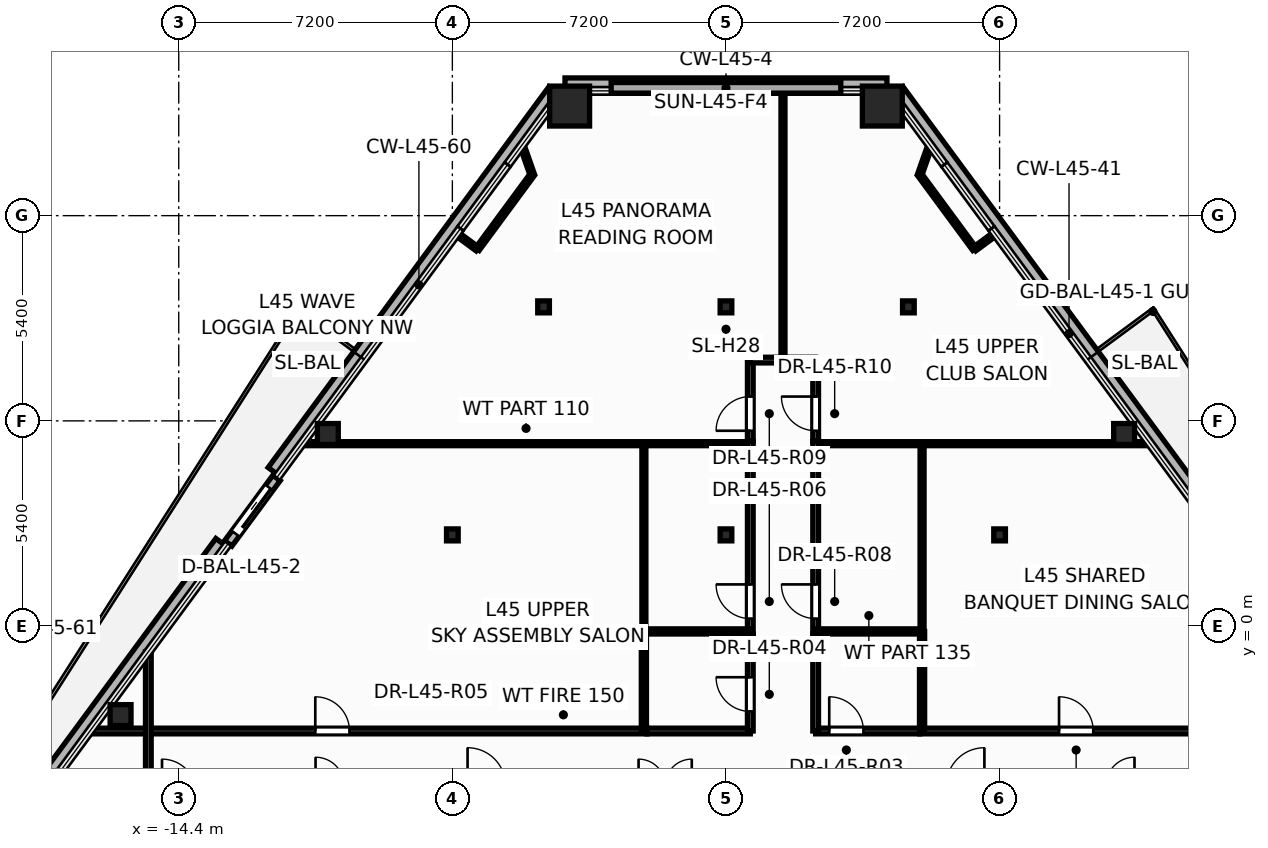
"""IFC4 building model, lengths in metres.
Left out: names, types, materials, properties, quantities, classifications, styles, units other than length and angle.
Written with IfcOpenShell. Run it as: python <this file> out.ifc"""

import sys

from ifc_helpers import new_model, si_unit, direction, frame, frame_2d, origin, origin_2d, place, context, subcontext, project, spatial, rectangle, hollow_rectangle, hollow_circle, i_section, extrude, element, fill, save


model = new_model("IFC4")
c1 = context("Model", 3, precision=1e-05, world=origin(), true_north=direction((0.0, 1.0)))
c2 = subcontext(c1, "Body", "Model", "MODEL_VIEW")
j1 = project(units=[si_unit("LENGTHUNIT", "METRE"), si_unit("PLANEANGLEUNIT", "RADIAN")], contexts=[c1])
p1 = place(None, origin())
s1 = spatial("IfcSite", under=j1, at=p1, CompositionType="ELEMENT")
p2 = place(p1, origin())
s2 = spatial("IfcBuilding", under=s1, at=p2, CompositionType="ELEMENT")
p3 = place(p2, frame((0.0, 0.0, 173.7)))
s3 = spatial("IfcBuildingStorey", under=s2, at=p3, CompositionType="ELEMENT", Elevation=173.7)
for number, where, z_axis, x_axis in (
    (1, (4.114, 13.684, 0.0), (0.0, 0.0, 1.0), (1.0, 0.0, 0.0)),
    (2, (-4.114, 13.684, 0.0), (0.0, 0.0, 1.0), (1.0, 0.0, 0.0)),
):
    element("IfcColumn", number, at=place(p3, frame(where, z_axis=z_axis, x_axis=x_axis)), inside=s3, PredefinedType="COLUMN", context=c2, shape_type="SweptSolid", body=[
        extrude(hollow_rectangle(XDim=1.05, YDim=1.05, WallThickness=0.045, at=origin_2d()), origin(), (0.0, 0.0, 1.0), 4.8),
    ])
for number, where, z_axis, x_axis in (
    (3, (10.477, 5.055, 0.0), (0.0, 0.0, 1.0), (1.0, 0.0, 0.0)),
    (4, (-10.477, 5.055, 0.0), (0.0, 0.0, 1.0), (1.0, 0.0, 0.0)),
    (5, (-15.931, -2.341, 0.0), (0.0, 0.0, 1.0), (1.0, 0.0, 0.0)),
):
    element("IfcColumn", number, at=place(p3, frame(where, z_axis=z_axis, x_axis=x_axis)), inside=s3, PredefinedType="COLUMN", context=c2, shape_type="SweptSolid", body=[
        extrude(hollow_circle(Radius=0.275, WallThickness=0.024, at=origin_2d()), origin(), (0.0, 0.0, 1.0), 4.8),
    ])
for number, where, z_axis, x_axis in (
    (6, (-7.2, 2.4, 0.0), (0.0, 0.0, 1.0), (1.0, 0.0, 0.0)),
    (7, (0.0, 2.4, 0.0), (0.0, 0.0, 1.0), (1.0, 0.0, 0.0)),
    (8, (7.2, 2.4, 0.0), (0.0, 0.0, 1.0), (1.0, 0.0, 0.0)),
    (9, (-4.8, 8.4, 0.0), (0.0, 0.0, 1.0), (1.0, 0.0, 0.0)),
    (10, (0.0, 8.4, 0.0), (0.0, 0.0, 1.0), (1.0, 0.0, 0.0)),
    (11, (4.8, 8.4, 0.0), (0.0, 0.0, 1.0), (1.0, 0.0, 0.0)),
):
    element("IfcColumn", number, at=place(p3, frame(where, z_axis=z_axis, x_axis=x_axis)), inside=s3, PredefinedType="COLUMN", context=c2, shape_type="SweptSolid", body=[
        extrude(i_section(OverallWidth=0.307, OverallDepth=0.314, WebThickness=0.012, FlangeThickness=0.019, at=origin_2d()), origin(), (0.0, 0.0, 1.0), 4.8),
    ])
p4 = place(p3, frame((13.795, 1.498, -0.2), z_axis=(0.0, 0.0, 1.0), x_axis=(-0.593484495124, 0.804845422455, 0.0)))
e12 = element("IfcWall", 12, at=p4, inside=s3, PredefinedType="PARAPET", context=c2, shape_type="SweptSolid", body=[
    extrude(rectangle(XDim=15.635, YDim=0.36, at=frame_2d((7.818, 0.0))), origin(), (0.0, 0.0, 1.0), 0.38),
])
p5 = place(p3, frame((4.236, 14.244, -0.2), z_axis=(0.0, 0.0, 1.0), x_axis=(-1.0, 0.0, 0.0)))
e13 = element("IfcWall", 13, at=p5, inside=s3, PredefinedType="PARAPET", context=c2, shape_type="SweptSolid", body=[
    extrude(rectangle(XDim=8.472, YDim=0.36, at=frame_2d((4.236, 0.0))), origin(), (0.0, 0.0, 1.0), 0.38),
])
p6 = place(p3, frame((-4.516, 14.082, -0.2), z_axis=(0.0, 0.0, 1.0), x_axis=(-0.593482739704, -0.804846716881, 0.0)))
e14 = element("IfcWall", 14, at=p6, inside=s3, PredefinedType="PARAPET", context=c2, shape_type="SweptSolid", body=[
    extrude(rectangle(XDim=12.445, YDim=0.36, at=frame_2d((6.222, 0.0))), origin(), (0.0, 0.0, 1.0), 0.38),
])
p7 = place(p3, frame((-13.279, 2.199, -0.2), z_axis=(0.0, 0.0, 1.0), x_axis=(-0.593480482425, -0.804848381362, 0.0)))
e15 = element("IfcWall", 15, at=p7, inside=s3, PredefinedType="PARAPET", context=c2, shape_type="SweptSolid", body=[
    extrude(rectangle(XDim=16.125, YDim=0.36, at=frame_2d((8.062, 0.0))), origin(), (0.0, 0.0, 1.0), 0.38),
])
p8 = place(p3, frame((-11.826, 3.899, -0.015), z_axis=(0.0, 0.0, 1.0), x_axis=(-0.593537527179, -0.804806314482, 0.0)))
e16 = element("IfcWall", 16, at=p8, inside=s3, PredefinedType="STANDARD", context=c2, shape_type="SweptSolid", body=[
    extrude(rectangle(XDim=2.14, YDim=0.24, at=frame_2d((1.07, 0.0))), origin(), (0.0, 0.0, 1.0), 4.007),
])
p9 = place(p8, frame((0.32, 0.0, 0.015)))
e17 = element("IfcOpeningElement", 17, at=p9, cuts=e16, PredefinedType="OPENING", context=c2, shape_type="SweptSolid", body=[
    extrude(rectangle(XDim=1.506, YDim=2.204, at=frame_2d((0.75, 1.102))), frame((0.0, 0.13, 0.0), z_axis=(0.0, -1.0, 0.0), x_axis=(1.0, 0.0, 0.0)), (0.0, 0.0, 1.0), 0.26),
])
p10 = place(p3, frame((-16.737, -2.76, 0.0), z_axis=(0.0, 0.0, 1.0), x_axis=(1.0, 0.0, 0.0)))
e18 = element("IfcWall", 18, at=p10, inside=s3, PredefinedType="PARTITIONING", context=c2, shape_type="SweptSolid", body=[
    extrude(rectangle(XDim=14.656, YDim=0.15, at=frame_2d((7.328, 0.0))), origin(), (0.0, 0.0, 1.0), 3.525),
])
p11 = place(p10, frame((5.929, 0.0, 0.0)))
e19 = element("IfcOpeningElement", 19, at=p11, cuts=e18, PredefinedType="OPENING", context=c2, shape_type="SweptSolid", body=[
    extrude(rectangle(XDim=0.906, YDim=2.104, at=frame_2d((0.45, 1.052))), frame((0.0, 0.085, 0.0), z_axis=(0.0, -1.0, 0.0), x_axis=(1.0, 0.0, 0.0)), (0.0, 0.0, 1.0), 0.17),
])
p12 = place(p3, frame((5.1, -2.76, 0.0), z_axis=(0.0, 0.0, 1.0), x_axis=(1.0, 0.0, 0.0)))
e20 = element("IfcWall", 20, at=p12, inside=s3, PredefinedType="PARTITIONING", context=c2, shape_type="SweptSolid", body=[
    extrude(rectangle(XDim=11.636, YDim=0.15, at=frame_2d((5.818, 0.0))), origin(), (0.0, 0.0, 1.0), 3.525),
])
p13 = place(p12, frame((3.664, 0.0, 0.0)))
e21 = element("IfcOpeningElement", 21, at=p13, cuts=e20, PredefinedType="OPENING", context=c2, shape_type="SweptSolid", body=[
    extrude(rectangle(XDim=0.906, YDim=2.104, at=frame_2d((0.45, 1.052))), frame((0.0, 0.085, 0.0), z_axis=(0.0, -1.0, 0.0), x_axis=(1.0, 0.0, 0.0)), (0.0, 0.0, 1.0), 0.17),
])
p14 = place(p3, frame((-11.162, 4.8, 0.0), z_axis=(0.0, 0.0, 1.0), x_axis=(1.0, 0.0, 0.0)))
e22 = element("IfcWall", 22, at=p14, inside=s3, PredefinedType="PARTITIONING", context=c2, shape_type="SweptSolid", body=[
    extrude(rectangle(XDim=11.802, YDim=0.105, at=frame_2d((5.901, 0.0))), origin(), (0.0, 0.0, 1.0), 3.525),
])
p15 = place(p3, frame((1.5, 7.0, 0.0), z_axis=(0.0, 0.0, 1.0), x_axis=(0.0, 1.0, 0.0)))
e23 = element("IfcWall", 23, at=p15, inside=s3, PredefinedType="PARTITIONING", context=c2, shape_type="SweptSolid", body=[
    extrude(rectangle(XDim=7.083, YDim=0.105, at=frame_2d((3.542, 0.0))), origin(), (0.0, 0.0, 1.0), 3.825),
])
p16 = place(p3, frame((2.36, 4.8, 0.0), z_axis=(0.0, 0.0, 1.0), x_axis=(1.0, 0.0, 0.0)))
e24 = element("IfcWall", 24, at=p16, inside=s3, PredefinedType="PARTITIONING", context=c2, shape_type="SweptSolid", body=[
    extrude(rectangle(XDim=8.802, YDim=0.105, at=frame_2d((4.401, 0.0))), origin(), (0.0, 0.0, 1.0), 3.825),
])
p17 = place(p3, frame((0.64, -0.2, 0.0), z_axis=(0.0, 0.0, 1.0), x_axis=(0.0, 1.0, 0.0)))
e25 = element("IfcWall", 25, at=p17, inside=s3, PredefinedType="PARTITIONING", context=c2, shape_type="SweptSolid", body=[
    extrude(rectangle(XDim=5.06, YDim=0.15, at=frame_2d((2.53, 0.0))), origin(), (0.0, 0.0, 1.0), 3.525),
])
p18 = place(p17, frame((0.397, 0.0, 0.0)))
e26 = element("IfcOpeningElement", 26, at=p18, cuts=e25, PredefinedType="OPENING", context=c2, shape_type="SweptSolid", body=[
    extrude(rectangle(XDim=0.906, YDim=2.104, at=frame_2d((0.45, 1.052))), frame((0.0, 0.085, 0.0), z_axis=(0.0, -1.0, 0.0), x_axis=(1.0, 0.0, 0.0)), (0.0, 0.0, 1.0), 0.17),
])
p19 = place(p3, frame((2.36, -0.2, 0.0), z_axis=(0.0, 0.0, 1.0), x_axis=(0.0, 1.0, 0.0)))
e27 = element("IfcWall", 27, at=p19, inside=s3, PredefinedType="PARTITIONING", context=c2, shape_type="SweptSolid", body=[
    extrude(rectangle(XDim=5.06, YDim=0.15, at=frame_2d((2.53, 0.0))), origin(), (0.0, 0.0, 1.0), 3.525),
])
p20 = place(p19, frame((0.397, 0.0, 0.0)))
e28 = element("IfcOpeningElement", 28, at=p20, cuts=e27, PredefinedType="OPENING", context=c2, shape_type="SweptSolid", body=[
    extrude(rectangle(XDim=0.906, YDim=2.104, at=frame_2d((0.45, 1.052))), frame((0.0, 0.085, 0.0), z_axis=(0.0, -1.0, 0.0), x_axis=(1.0, 0.0, 0.0)), (0.0, 0.0, 1.0), 0.17),
])
for number, where, z_axis, x_axis in (
    (29, (-2.16, -0.2, 0.0), (0.0, 0.0, 1.0), (0.0, 1.0, 0.0)),
    (30, (5.16, -0.2, 0.0), (0.0, 0.0, 1.0), (0.0, 1.0, 0.0)),
):
    element("IfcWall", number, at=place(p3, frame(where, z_axis=z_axis, x_axis=x_axis)), inside=s3, PredefinedType="PARTITIONING", context=c2, shape_type="SweptSolid", body=[
        extrude(rectangle(XDim=5.0, YDim=0.105, at=frame_2d((2.5, 0.0))), origin(), (0.0, 0.0, 1.0), 3.525),
    ])
p21 = place(p3, frame((-15.2, -4.4, 0.0), z_axis=(0.0, 0.0, 1.0), x_axis=(0.0, 1.0, 0.0)))
e31 = element("IfcWall", 31, at=p21, inside=s3, PredefinedType="PARTITIONING", context=c2, shape_type="SweptSolid", body=[
    extrude(rectangle(XDim=3.724, YDim=0.15, at=frame_2d((1.862, 0.0))), origin(), (0.0, 0.0, 1.0), 3.825),
])
p22 = place(p3, frame((2.36, -2.76, 0.0), z_axis=(0.0, 0.0, 1.0), x_axis=(1.0, 0.0, 0.0)))
e32 = element("IfcWall", 32, at=p22, inside=s3, PredefinedType="PARTITIONING", context=c2, shape_type="SweptSolid", body=[
    extrude(rectangle(XDim=2.738, YDim=0.15, at=frame_2d((1.369, 0.0))), origin(), (0.0, 0.0, 1.0), 4.169),
])
p23 = place(p22, frame((0.357, 0.0, 0.0)))
e33 = element("IfcOpeningElement", 33, at=p23, cuts=e32, PredefinedType="OPENING", context=c2, shape_type="SweptSolid", body=[
    extrude(rectangle(XDim=0.906, YDim=2.104, at=frame_2d((0.45, 1.052))), frame((0.0, 0.085, 0.0), z_axis=(0.0, -1.0, 0.0), x_axis=(1.0, 0.0, 0.0)), (0.0, 0.0, 1.0), 0.17),
])
p24 = place(p3, frame((-2.078, -2.76, 0.0), z_axis=(0.0, 0.0, 1.0), x_axis=(1.0, 0.0, 0.0)))
e34 = element("IfcWall", 34, at=p24, inside=s3, PredefinedType="PARTITIONING", context=c2, shape_type="SweptSolid", body=[
    extrude(rectangle(XDim=2.718, YDim=0.15, at=frame_2d((1.359, 0.0))), origin(), (0.0, 0.0, 1.0), 3.525),
])
p25 = place(p3, frame((2.36, -0.14, 0.0), z_axis=(0.0, 0.0, 1.0), x_axis=(1.0, 0.0, 0.0)))
e35 = element("IfcWall", 35, at=p25, inside=s3, PredefinedType="PARTITIONING", context=c2, shape_type="SweptSolid", body=[
    extrude(rectangle(XDim=2.8, YDim=0.135, at=frame_2d((1.4, 0.0))), origin(), (0.0, 0.0, 1.0), 4.169),
])
p26 = place(p3, frame((-2.16, -0.14, 0.0), z_axis=(0.0, 0.0, 1.0), x_axis=(1.0, 0.0, 0.0)))
e36 = element("IfcWall", 36, at=p26, inside=s3, PredefinedType="PARTITIONING", context=c2, shape_type="SweptSolid", body=[
    extrude(rectangle(XDim=2.8, YDim=0.135, at=frame_2d((1.4, 0.0))), origin(), (0.0, 0.0, 1.0), 3.525),
])
p27 = place(p3, frame((2.36, -2.76, 0.0), z_axis=(0.0, 0.0, 1.0), x_axis=(0.0, 1.0, 0.0)))
e37 = element("IfcWall", 37, at=p27, inside=s3, PredefinedType="PARTITIONING", context=c2, shape_type="SweptSolid", body=[
    extrude(rectangle(XDim=2.558, YDim=0.15, at=frame_2d((1.279, 0.0))), origin(), (0.0, 0.0, 1.0), 4.55),
])
p28 = place(p3, frame((0.64, -2.76, 0.0), z_axis=(0.0, 0.0, 1.0), x_axis=(0.0, 1.0, 0.0)))
e38 = element("IfcWall", 38, at=p28, inside=s3, PredefinedType="PARTITIONING", context=c2, shape_type="SweptSolid", body=[
    extrude(rectangle(XDim=2.558, YDim=0.15, at=frame_2d((1.279, 0.0))), origin(), (0.0, 0.0, 1.0), 4.55),
])
p29 = place(p28, frame((0.515, 0.0, 0.0)))
e39 = element("IfcOpeningElement", 39, at=p29, cuts=e38, PredefinedType="OPENING", context=c2, shape_type="SweptSolid", body=[
    extrude(rectangle(XDim=0.906, YDim=2.104, at=frame_2d((0.45, 1.052))), frame((0.0, 0.085, 0.0), z_axis=(0.0, -1.0, 0.0), x_axis=(1.0, 0.0, 0.0)), (0.0, 0.0, 1.0), 0.17),
])
for number, where, z_axis, x_axis in (
    (40, (5.16, -2.76, 0.0), (0.0, 0.0, 1.0), (0.0, 1.0, 0.0)),
    (41, (-2.16, -2.76, 0.0), (0.0, 0.0, 1.0), (0.0, 1.0, 0.0)),
):
    element("IfcWall", number, at=place(p3, frame(where, z_axis=z_axis, x_axis=x_axis)), inside=s3, PredefinedType="PARTITIONING", context=c2, shape_type="SweptSolid", body=[
        extrude(rectangle(XDim=2.62, YDim=0.135, at=frame_2d((1.31, 0.0))), origin(), (0.0, 0.0, 1.0), 4.55),
    ])
for number, where, z_axis, x_axis in (
    (42, (-5.098, 11.878, 0.0), (0.0, 0.0, 1.0), (-0.593, -0.805, 0.0)),
    (43, (6.54, 9.922, 0.0), (0.0, 0.0, 1.0), (-0.593, 0.805, 0.0)),
):
    element("IfcWall", number, at=place(p3, frame(where, z_axis=z_axis, x_axis=x_axis)), inside=s3, PredefinedType="PARTITIONING", context=c2, shape_type="SweptSolid", body=[
        extrude(rectangle(XDim=2.43, YDim=0.12, at=frame_2d((1.215, 0.0))), origin(), (0.0, 0.0, 1.0), 4.55),
    ])
p30 = place(p3, frame((0.64, 4.862, 0.0), z_axis=(0.0, 0.0, 1.0), x_axis=(0.0, 1.0, 0.0)))
e44 = element("IfcWall", 44, at=p30, inside=s3, PredefinedType="PARTITIONING", context=c2, shape_type="SweptSolid", body=[
    extrude(rectangle(XDim=2.138, YDim=0.15, at=frame_2d((1.069, 0.0))), origin(), (0.0, 0.0, 1.0), 4.55),
])
p31 = place(p30, frame((0.278, 0.0, 0.0)))
e45 = element("IfcOpeningElement", 45, at=p31, cuts=e44, PredefinedType="OPENING", context=c2, shape_type="SweptSolid", body=[
    extrude(rectangle(XDim=0.906, YDim=2.104, at=frame_2d((0.45, 1.052))), frame((0.0, 0.085, 0.0), z_axis=(0.0, -1.0, 0.0), x_axis=(1.0, 0.0, 0.0)), (0.0, 0.0, 1.0), 0.17),
])
p32 = place(p3, frame((2.36, 4.862, 0.0), z_axis=(0.0, 0.0, 1.0), x_axis=(0.0, 1.0, 0.0)))
e46 = element("IfcWall", 46, at=p32, inside=s3, PredefinedType="PARTITIONING", context=c2, shape_type="SweptSolid", body=[
    extrude(rectangle(XDim=2.138, YDim=0.15, at=frame_2d((1.069, 0.0))), origin(), (0.0, 0.0, 1.0), 4.169),
])
p33 = place(p32, frame((0.278, 0.0, 0.0)))
e47 = element("IfcOpeningElement", 47, at=p33, cuts=e46, PredefinedType="OPENING", context=c2, shape_type="SweptSolid", body=[
    extrude(rectangle(XDim=0.906, YDim=2.104, at=frame_2d((0.45, 1.052))), frame((0.0, 0.085, 0.0), z_axis=(0.0, -1.0, 0.0), x_axis=(1.0, 0.0, 0.0)), (0.0, 0.0, 1.0), 0.17),
])
p34 = place(p3, frame((0.64, 7.0, 0.0), z_axis=(0.0, 0.0, 1.0), x_axis=(1.0, 0.0, 0.0)))
e48 = element("IfcWall", 48, at=p34, inside=s3, PredefinedType="PARTITIONING", context=c2, shape_type="SweptSolid", body=[
    extrude(rectangle(XDim=1.72, YDim=0.15, at=frame_2d((0.86, 0.0))), origin(), (0.0, 0.0, 1.0), 4.169),
])
for number, where, z_axis, x_axis in (
    (49, (-5.367, 12.642, 0.0), (0.0, 0.0, 1.0), (0.332, -0.943, 0.0)),
    (50, (5.098, 11.878, 0.0), (0.0, 0.0, 1.0), (0.332, 0.943, 0.0)),
):
    element("IfcWall", number, at=place(p3, frame(where, z_axis=z_axis, x_axis=x_axis)), inside=s3, PredefinedType="PARTITIONING", context=c2, shape_type="SweptSolid", body=[
        extrude(rectangle(XDim=0.81, YDim=0.12, at=frame_2d((0.405, 0.0))), origin(), (0.0, 0.0, 1.0), 3.992),
    ])
for number, where, z_axis, x_axis in (
    (51, (-6.54, 9.922, 0.0), (0.0, 0.0, 1.0), (-0.805, 0.594, 0.0)),
    (52, (7.079, 10.32, 0.0), (0.0, 0.0, 1.0), (-0.805, -0.594, 0.0)),
):
    element("IfcWall", number, at=place(p3, frame(where, z_axis=z_axis, x_axis=x_axis)), inside=s3, PredefinedType="PARTITIONING", context=c2, shape_type="SweptSolid", body=[
        extrude(rectangle(XDim=0.67, YDim=0.12, at=frame_2d((0.335, 0.0))), origin(), (0.0, 0.0, 1.0), 3.992),
    ])
p35 = place(p9, origin())
e53 = element("IfcDoor", 53, at=p35, inside=s3, OperationType="SLIDING_TO_RIGHT", PredefinedType="DOOR", context=c2, shape_type="SweptSolid", body=[
    extrude(rectangle(XDim=1.5, YDim=2.2, at=frame_2d((0.75, 1.1))), frame((0.0, 0.025, 0.0), z_axis=(0.0, -1.0, 0.0), x_axis=(1.0, 0.0, 0.0)), (0.0, 0.0, 1.0), 0.05),
])
fill(e17, e53)
p36 = place(p23, origin())
e54 = element("IfcDoor", 54, at=p36, inside=s3, OperationType="SINGLE_SWING_LEFT", PredefinedType="DOOR", context=c2, shape_type="SweptSolid", body=[
    extrude(rectangle(XDim=0.9, YDim=2.1, at=frame_2d((0.45, 1.05))), frame((0.0, 0.025, 0.0), z_axis=(0.0, -1.0, 0.0), x_axis=(1.0, 0.0, 0.0)), (0.0, 0.0, 1.0), 0.05),
])
fill(e33, e54)
p37 = place(p29, origin())
e55 = element("IfcDoor", 55, at=p37, inside=s3, OperationType="SINGLE_SWING_RIGHT", PredefinedType="DOOR", context=c2, shape_type="SweptSolid", body=[
    extrude(rectangle(XDim=0.9, YDim=2.1, at=frame_2d((0.45, 1.05))), frame((0.0, 0.025, 0.0), z_axis=(0.0, -1.0, 0.0), x_axis=(1.0, 0.0, 0.0)), (0.0, 0.0, 1.0), 0.05),
])
fill(e39, e55)
p38 = place(p11, origin())
e56 = element("IfcDoor", 56, at=p38, inside=s3, OperationType="SINGLE_SWING_LEFT", PredefinedType="DOOR", context=c2, shape_type="SweptSolid", body=[
    extrude(rectangle(XDim=0.9, YDim=2.1, at=frame_2d((0.45, 1.05))), frame((0.0, 0.025, 0.0), z_axis=(0.0, -1.0, 0.0), x_axis=(1.0, 0.0, 0.0)), (0.0, 0.0, 1.0), 0.05),
])
fill(e19, e56)
p39 = place(p18, origin())
e57 = element("IfcDoor", 57, at=p39, inside=s3, OperationType="SINGLE_SWING_RIGHT", PredefinedType="DOOR", context=c2, shape_type="SweptSolid", body=[
    extrude(rectangle(XDim=0.9, YDim=2.1, at=frame_2d((0.45, 1.05))), frame((0.0, 0.025, 0.0), z_axis=(0.0, -1.0, 0.0), x_axis=(1.0, 0.0, 0.0)), (0.0, 0.0, 1.0), 0.05),
])
fill(e26, e57)
p40 = place(p13, origin())
e58 = element("IfcDoor", 58, at=p40, inside=s3, OperationType="SINGLE_SWING_LEFT", PredefinedType="DOOR", context=c2, shape_type="SweptSolid", body=[
    extrude(rectangle(XDim=0.9, YDim=2.1, at=frame_2d((0.45, 1.05))), frame((0.0, 0.025, 0.0), z_axis=(0.0, -1.0, 0.0), x_axis=(1.0, 0.0, 0.0)), (0.0, 0.0, 1.0), 0.05),
])
fill(e21, e58)
p41 = place(p20, origin())
e59 = element("IfcDoor", 59, at=p41, inside=s3, OperationType="SINGLE_SWING_RIGHT", PredefinedType="DOOR", context=c2, shape_type="SweptSolid", body=[
    extrude(rectangle(XDim=0.9, YDim=2.1, at=frame_2d((0.45, 1.05))), frame((0.0, 0.025, 0.0), z_axis=(0.0, -1.0, 0.0), x_axis=(1.0, 0.0, 0.0)), (0.0, 0.0, 1.0), 0.05),
])
fill(e28, e59)
p42 = place(p31, origin())
e60 = element("IfcDoor", 60, at=p42, inside=s3, OperationType="SINGLE_SWING_LEFT", PredefinedType="DOOR", context=c2, shape_type="SweptSolid", body=[
    extrude(rectangle(XDim=0.9, YDim=2.1, at=frame_2d((0.45, 1.05))), frame((0.0, 0.025, 0.0), z_axis=(0.0, -1.0, 0.0), x_axis=(1.0, 0.0, 0.0)), (0.0, 0.0, 1.0), 0.05),
])
fill(e45, e60)
p43 = place(p33, origin())
e61 = element("IfcDoor", 61, at=p43, inside=s3, OperationType="SINGLE_SWING_RIGHT", PredefinedType="DOOR", context=c2, shape_type="SweptSolid", body=[
    extrude(rectangle(XDim=0.9, YDim=2.1, at=frame_2d((0.45, 1.05))), frame((0.0, 0.025, 0.0), z_axis=(0.0, -1.0, 0.0), x_axis=(1.0, 0.0, 0.0)), (0.0, 0.0, 1.0), 0.05),
])
fill(e47, e61)
save(model, sys.argv[1])
